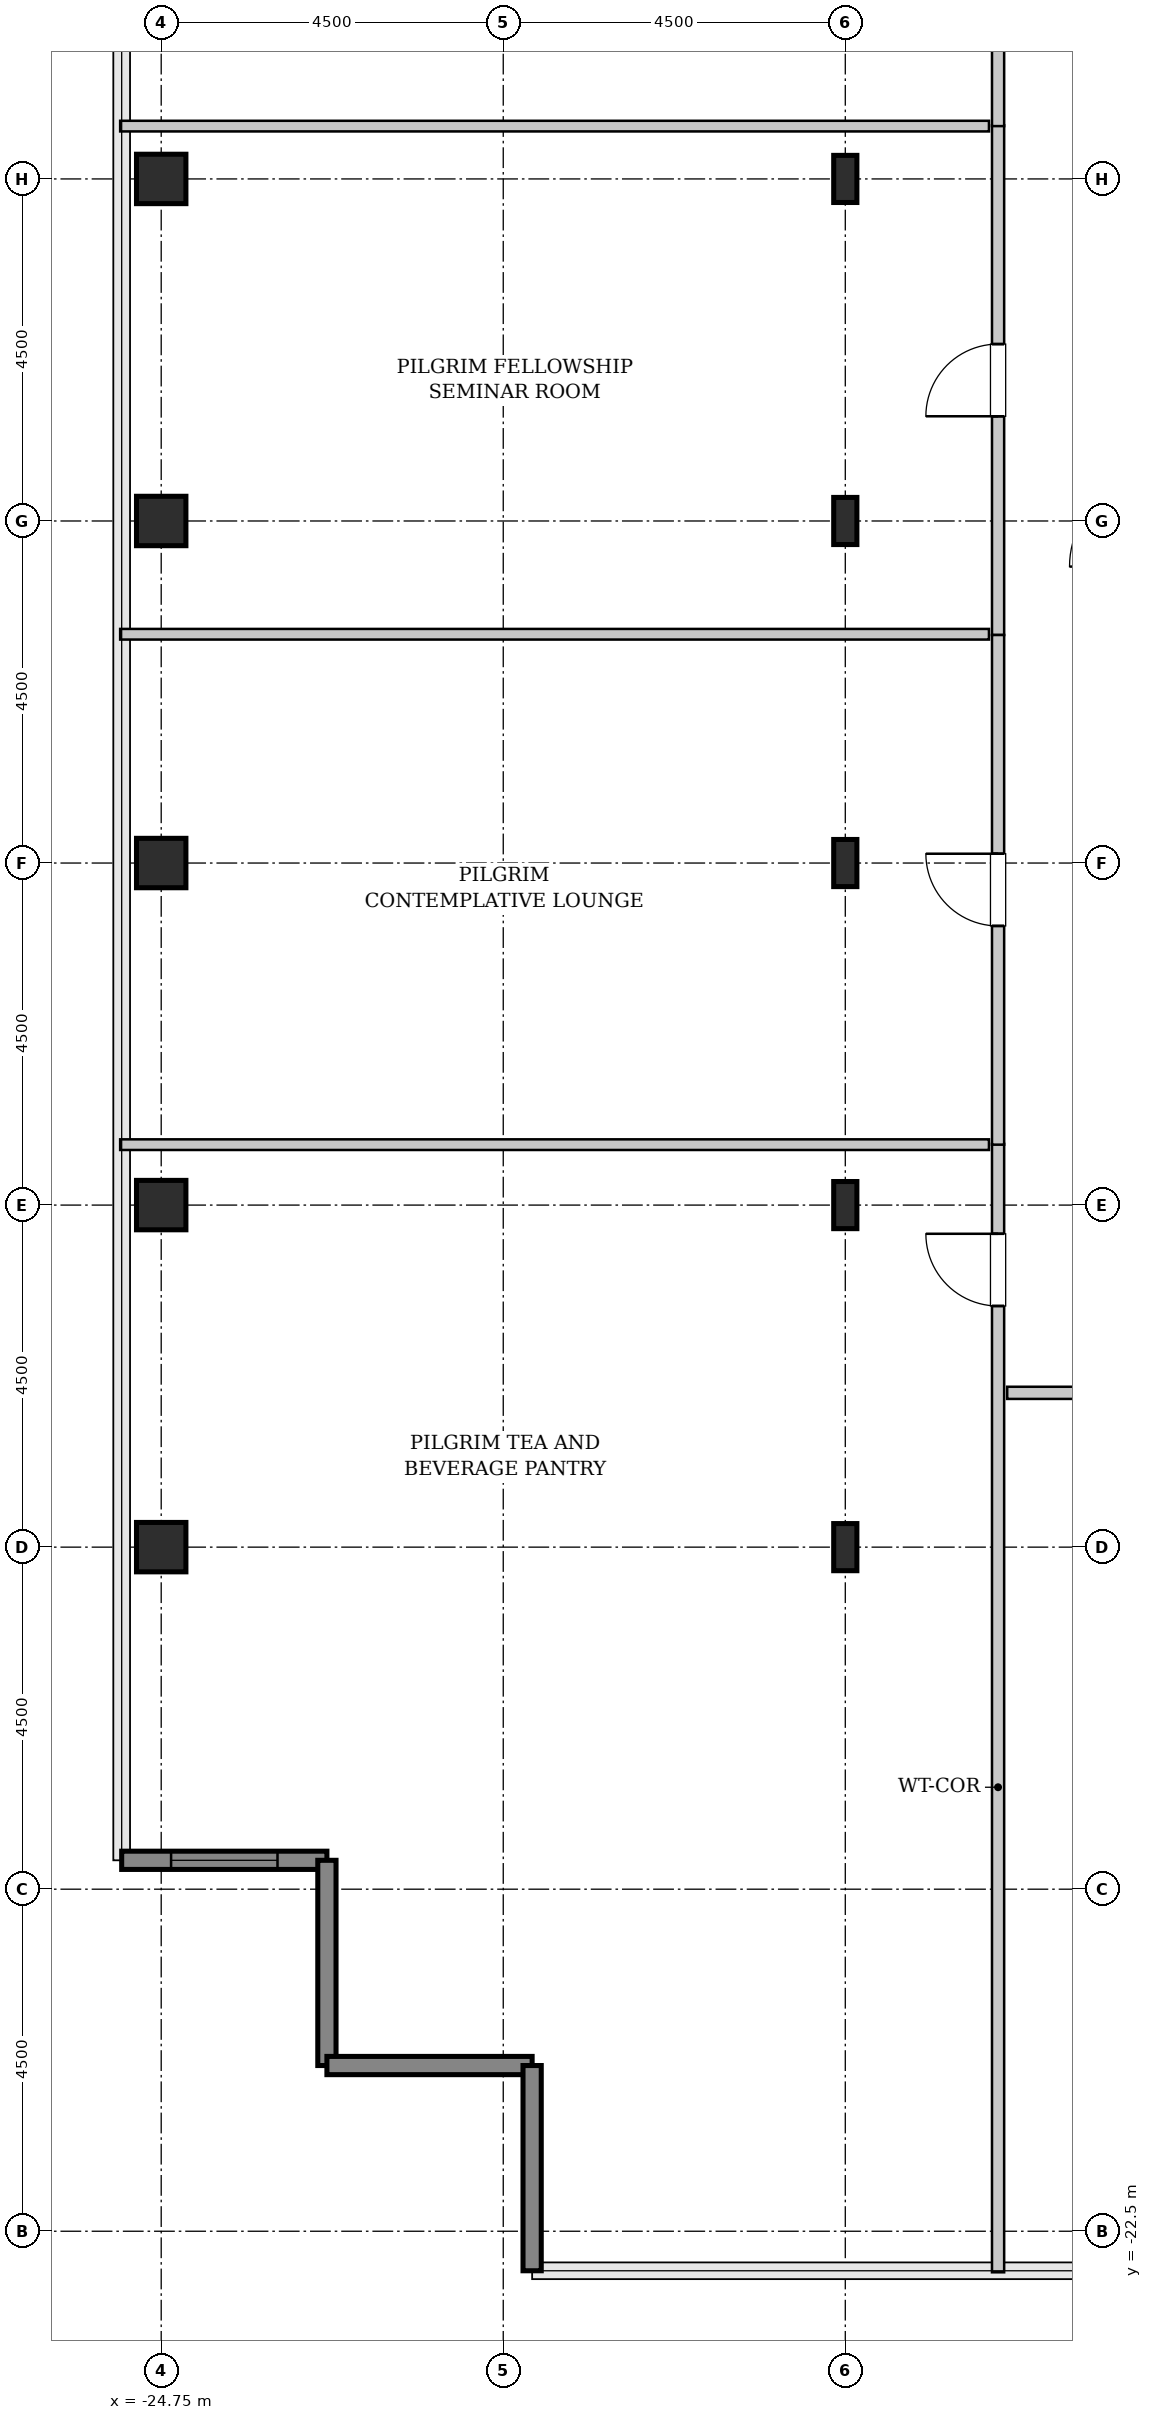
"""IFC4 building model, lengths in metres.
Left out: names, types, materials, properties, quantities, classifications, styles, units other than length and angle.
Written with IfcOpenShell. Run it as: python <this file> out.ifc"""

import sys

from ifc_helpers import new_model, si_unit, direction, frame, frame_2d, origin, origin_2d, place, context, subcontext, project, spatial, rectangle, hollow_rectangle, i_section, extrude, source, transform, mapped, element, fill, save


model = new_model("IFC4")
c1 = context("Model", 3, precision=1e-05, world=origin(), true_north=direction((0.0, 1.0)))
c2 = subcontext(c1, "Body", "Model", "MODEL_VIEW")
j1 = project(units=[si_unit("LENGTHUNIT", "METRE"), si_unit("PLANEANGLEUNIT", "RADIAN")], contexts=[c1])
p1 = place(None, origin())
s1 = spatial("IfcSite", under=j1, at=p1, CompositionType="ELEMENT")
p2 = place(p1, origin())
s2 = spatial("IfcBuilding", under=s1, at=p2, CompositionType="ELEMENT")
p3 = place(p2, frame((0.0, 0.0, 268.4)))
s3 = spatial("IfcBuildingStorey", under=s2, at=p3, CompositionType="ELEMENT", Elevation=268.4)
m1 = source(origin(), c2, "Body", "SweptSolid", [
    extrude(hollow_rectangle(XDim=0.65, YDim=0.65, WallThickness=0.032, InnerFilletRadius=0.032, OuterFilletRadius=0.064, at=origin_2d()), origin(), (0.0, 0.0, 1.0), 3.8),
])
for number, where, z_axis, x_axis in (
    (1, (-24.75, -13.5, 0.0), (0.0, 0.0, 1.0), (1.0, 0.0, 0.0)),
    (2, (-24.75, -9.0, 0.0), (0.0, 0.0, 1.0), (1.0, 0.0, 0.0)),
    (3, (-24.75, -4.5, 0.0), (0.0, 0.0, 1.0), (1.0, 0.0, 0.0)),
    (4, (-24.75, 0.0, 0.0), (0.0, 0.0, 1.0), (1.0, 0.0, 0.0)),
    (5, (-24.75, 4.5, 0.0), (0.0, 0.0, 1.0), (1.0, 0.0, 0.0)),
):
    element("IfcColumn", number, at=place(p3, frame(where, z_axis=z_axis, x_axis=x_axis)), inside=s3, PredefinedType="COLUMN", context=c2, shape_type="MappedRepresentation", body=[
        mapped(m1, transform((0.0, 0.0, 0.0), x_axis=(1.0, 0.0, 0.0), y_axis=(0.0, 1.0, 0.0), z_axis=(0.0, 0.0, 1.0), scale=1.0)),
    ])
m2 = source(origin(), c2, "Body", "SweptSolid", [
    extrude(i_section(OverallWidth=0.305, OverallDepth=0.62, WebThickness=0.021, FlangeThickness=0.04, FilletRadius=0.027, at=origin_2d()), origin(), (0.0, 0.0, 1.0), 3.8),
])
for number, where, z_axis, x_axis in (
    (6, (-15.75, -13.5, 0.0), (0.0, 0.0, 1.0), (1.0, 0.0, 0.0)),
    (7, (-15.75, -9.0, 0.0), (0.0, 0.0, 1.0), (1.0, 0.0, 0.0)),
    (8, (-15.75, -4.5, 0.0), (0.0, 0.0, 1.0), (1.0, 0.0, 0.0)),
    (9, (-15.75, 0.0, 0.0), (0.0, 0.0, 1.0), (1.0, 0.0, 0.0)),
    (10, (-15.75, 4.5, 0.0), (0.0, 0.0, 1.0), (1.0, 0.0, 0.0)),
):
    element("IfcColumn", number, at=place(p3, frame(where, z_axis=z_axis, x_axis=x_axis)), inside=s3, PredefinedType="COLUMN", context=c2, shape_type="MappedRepresentation", body=[
        mapped(m2, transform((0.0, 0.0, 0.0), x_axis=(1.0, 0.0, 0.0), y_axis=(0.0, 1.0, 0.0), z_axis=(0.0, 0.0, 1.0), scale=1.0)),
    ])
m3 = source(origin(), c2, "Body", "SweptSolid", [
    extrude(rectangle(XDim=2.7, YDim=0.24, at=frame_2d((1.35, 0.0))), origin(), (0.0, 0.0, 1.0), 3.55),
])
p4 = place(p3, frame((-25.27, -17.62, 0.0), z_axis=(0.0, 0.0, 1.0), x_axis=(1.0, 0.0, 0.0)))
e11 = element("IfcWall", 11, at=p4, inside=s3, PredefinedType="SHEAR", context=c2, shape_type="MappedRepresentation", body=[
    mapped(m3, transform((0.0, 0.0, 0.0), x_axis=(1.0, 0.0, 0.0), y_axis=(0.0, 1.0, 0.0), z_axis=(0.0, 0.0, 1.0), scale=1.0)),
])
p5 = place(p4, frame((0.65, 0.0, 0.85)))
e12 = element("IfcOpeningElement", 12, at=p5, cuts=e11, PredefinedType="OPENING", context=c2, shape_type="SweptSolid", body=[
    extrude(rectangle(XDim=1.4, YDim=1.8, at=frame_2d((0.7, 0.9))), frame((0.0, 0.13, 0.0), z_axis=(0.0, -1.0, 0.0), x_axis=(1.0, 0.0, 0.0)), (0.0, 0.0, 1.0), 0.26),
])
for number, where, z_axis, x_axis in (
    (13, (-22.57, -17.62, 0.0), (0.0, 0.0, 1.0), (0.0, -1.0, 0.0)),
    (14, (-22.57, -20.32, 0.0), (0.0, 0.0, 1.0), (1.0, 0.0, 0.0)),
    (15, (-19.87, -20.32, 0.0), (0.0, 0.0, 1.0), (0.0, -1.0, 0.0)),
):
    element("IfcWall", number, at=place(p3, frame(where, z_axis=z_axis, x_axis=x_axis)), inside=s3, PredefinedType="SHEAR", context=c2, shape_type="MappedRepresentation", body=[
        mapped(m3, transform((0.0, 0.0, 0.0), x_axis=(1.0, 0.0, 0.0), y_axis=(0.0, 1.0, 0.0), z_axis=(0.0, 0.0, 1.0), scale=1.0)),
    ])
m4 = source(origin(), c2, "Body", "SweptSolid", [
    extrude(rectangle(XDim=14.845, YDim=0.16, at=frame_2d((7.422, 0.0))), origin(), (0.0, 0.0, 1.0), 3.535),
])
p6 = place(p3, frame((-13.74, -23.04, 0.0), z_axis=(0.0, 0.0, 1.0), x_axis=(0.0, 1.0, 0.0)))
e16 = element("IfcWall", 16, at=p6, inside=s3, PredefinedType="PARTITIONING", context=c2, shape_type="MappedRepresentation", body=[
    mapped(m4, transform((0.0, 0.0, 0.0), x_axis=(1.0, 0.0, 0.0), y_axis=(0.0, 1.0, 0.0), z_axis=(0.0, 0.0, 1.0), scale=1.0)),
])
p7 = place(p6, frame((12.712, 0.0, 0.0)))
e17 = element("IfcOpeningElement", 17, at=p7, cuts=e16, PredefinedType="OPENING", context=c2, shape_type="SweptSolid", body=[
    extrude(rectangle(XDim=0.95, YDim=2.1, at=frame_2d((0.475, 1.05))), frame((0.0, 0.09, 0.0), z_axis=(0.0, -1.0, 0.0), x_axis=(1.0, 0.0, 0.0)), (0.0, 0.0, 1.0), 0.18),
])
m5 = source(origin(), c2, "Body", "SweptSolid", [
    extrude(rectangle(XDim=11.43, YDim=0.14, at=frame_2d((5.715, 0.0))), origin(), (0.0, 0.0, 1.0), 3.535),
])
p8 = place(p3, frame((-25.29, -8.205, 0.0), z_axis=(0.0, 0.0, 1.0), x_axis=(1.0, 0.0, 0.0)))
e18 = element("IfcWall", 18, at=p8, inside=s3, PredefinedType="PARTITIONING", context=c2, shape_type="MappedRepresentation", body=[
    mapped(m5, transform((0.0, 0.0, 0.0), x_axis=(1.0, 0.0, 0.0), y_axis=(0.0, 1.0, 0.0), z_axis=(0.0, 0.0, 1.0), scale=1.0)),
])
m6 = source(origin(), c2, "Body", "SweptSolid", [
    extrude(rectangle(XDim=6.705, YDim=0.16, at=frame_2d((3.353, 0.0))), origin(), (0.0, 0.0, 1.0), 3.535),
])
p9 = place(p3, frame((-13.74, -1.5, 0.0), z_axis=(0.0, 0.0, 1.0), x_axis=(0.0, 1.0, 0.0)))
e19 = element("IfcWall", 19, at=p9, inside=s3, PredefinedType="PARTITIONING", context=c2, shape_type="MappedRepresentation", body=[
    mapped(m6, transform((0.0, 0.0, 0.0), x_axis=(1.0, 0.0, 0.0), y_axis=(0.0, 1.0, 0.0), z_axis=(0.0, 0.0, 1.0), scale=1.0)),
])
p10 = place(p9, frame((2.877, 0.0, 0.0)))
e20 = element("IfcOpeningElement", 20, at=p10, cuts=e19, PredefinedType="OPENING", context=c2, shape_type="SweptSolid", body=[
    extrude(rectangle(XDim=0.95, YDim=2.1, at=frame_2d((0.475, 1.05))), frame((0.0, 0.09, 0.0), z_axis=(0.0, -1.0, 0.0), x_axis=(1.0, 0.0, 0.0)), (0.0, 0.0, 1.0), 0.18),
])
for number, where, z_axis, x_axis in (
    (21, (-25.29, 5.195, 0.0), (0.0, 0.0, 1.0), (1.0, 0.0, 0.0)),
    (22, (-25.29, -1.49, 0.0), (0.0, 0.0, 1.0), (1.0, 0.0, 0.0)),
):
    element("IfcWall", number, at=place(p3, frame(where, z_axis=z_axis, x_axis=x_axis)), inside=s3, PredefinedType="PARTITIONING", context=c2, shape_type="MappedRepresentation", body=[
        mapped(m5, transform((0.0, 0.0, 0.0), x_axis=(1.0, 0.0, 0.0), y_axis=(0.0, 1.0, 0.0), z_axis=(0.0, 0.0, 1.0), scale=1.0)),
    ])
p11 = place(p3, frame((-13.74, -8.205, 0.0), z_axis=(0.0, 0.0, 1.0), x_axis=(0.0, 1.0, 0.0)))
e23 = element("IfcWall", 23, at=p11, inside=s3, PredefinedType="PARTITIONING", context=c2, shape_type="MappedRepresentation", body=[
    mapped(m6, transform((0.0, 0.0, 0.0), x_axis=(1.0, 0.0, 0.0), y_axis=(0.0, 1.0, 0.0), z_axis=(0.0, 0.0, 1.0), scale=1.0)),
])
p12 = place(p11, frame((2.877, 0.0, 0.0)))
e24 = element("IfcOpeningElement", 24, at=p12, cuts=e23, PredefinedType="OPENING", context=c2, shape_type="SweptSolid", body=[
    extrude(rectangle(XDim=0.95, YDim=2.1, at=frame_2d((0.475, 1.05))), frame((0.0, 0.09, 0.0), z_axis=(0.0, -1.0, 0.0), x_axis=(1.0, 0.0, 0.0)), (0.0, 0.0, 1.0), 0.18),
])
m7 = source(origin(), c2, "Body", "SweptSolid", [
    extrude(rectangle(XDim=16.045, YDim=0.16, at=frame_2d((8.022, 0.0))), origin(), (0.0, 0.0, 1.0), 3.535),
])
p13 = place(p3, frame((-13.74, 5.195, 0.0), z_axis=(0.0, 0.0, 1.0), x_axis=(0.0, 1.0, 0.0)))
e25 = element("IfcWall", 25, at=p13, inside=s3, PredefinedType="PARTITIONING", context=c2, shape_type="MappedRepresentation", body=[
    mapped(m7, transform((0.0, 0.0, 0.0), x_axis=(1.0, 0.0, 0.0), y_axis=(0.0, 1.0, 0.0), z_axis=(0.0, 0.0, 1.0), scale=1.0)),
])
p14 = place(p13, frame((2.683, 0.0, 0.0)))
e26 = element("IfcOpeningElement", 26, at=p14, cuts=e25, PredefinedType="OPENING", context=c2, shape_type="SweptSolid", body=[
    extrude(rectangle(XDim=0.95, YDim=2.1, at=frame_2d((0.475, 1.05))), frame((0.0, 0.09, 0.0), z_axis=(0.0, -1.0, 0.0), x_axis=(1.0, 0.0, 0.0)), (0.0, 0.0, 1.0), 0.18),
])
m8 = source(origin(), c2, "Body", "SweptSolid", [
    extrude(rectangle(XDim=4.425, YDim=0.16, at=frame_2d((2.212, 0.0))), origin(), (0.0, 0.0, 1.0), 3.535),
])
p15 = place(p3, frame((-13.62, -11.47, 0.0), z_axis=(0.0, 0.0, 1.0), x_axis=(1.0, 0.0, 0.0)))
e27 = element("IfcWall", 27, at=p15, inside=s3, PredefinedType="PARTITIONING", context=c2, shape_type="MappedRepresentation", body=[
    mapped(m8, transform((0.0, 0.0, 0.0), x_axis=(1.0, 0.0, 0.0), y_axis=(0.0, 1.0, 0.0), z_axis=(0.0, 0.0, 1.0), scale=1.0)),
])
p16 = place(p15, frame((1.738, 0.0, 0.0)))
e28 = element("IfcOpeningElement", 28, at=p16, cuts=e27, PredefinedType="OPENING", context=c2, shape_type="SweptSolid", body=[
    extrude(rectangle(XDim=0.95, YDim=2.1, at=frame_2d((0.475, 1.05))), frame((0.0, 0.09, 0.0), z_axis=(0.0, -1.0, 0.0), x_axis=(1.0, 0.0, 0.0)), (0.0, 0.0, 1.0), 0.18),
])
m9 = source(origin(), c2, "Body", "SweptSolid", [
    extrude(rectangle(XDim=1.4, YDim=1.8, at=frame_2d((0.7, 0.9))), frame((0.0, 0.03, 0.0), z_axis=(0.0, -1.0, 0.0), x_axis=(1.0, 0.0, 0.0)), (0.0, 0.0, 1.0), 0.06),
])
p17 = place(p5, origin())
e29 = element("IfcWindow", 29, at=p17, inside=s3, PartitioningType="SINGLE_PANEL", PredefinedType="WINDOW", context=c2, shape_type="MappedRepresentation", body=[
    mapped(m9, transform((0.0, 0.0, 0.0), x_axis=(1.0, 0.0, 0.0), y_axis=(0.0, 1.0, 0.0), z_axis=(0.0, 0.0, 1.0), scale=1.0)),
])
fill(e12, e29)
m10 = source(origin(), c2, "Body", "SweptSolid", [
    extrude(rectangle(XDim=0.95, YDim=2.1, at=frame_2d((0.475, 1.05))), frame((0.0, 0.025, 0.0), z_axis=(0.0, -1.0, 0.0), x_axis=(1.0, 0.0, 0.0)), (0.0, 0.0, 1.0), 0.05),
])
p18 = place(p7, origin())
e30 = element("IfcDoor", 30, at=p18, inside=s3, OperationType="SINGLE_SWING_RIGHT", PredefinedType="DOOR", context=c2, shape_type="MappedRepresentation", body=[
    mapped(m10, transform((0.0, 0.0, 0.0), x_axis=(1.0, 0.0, 0.0), y_axis=(0.0, 1.0, 0.0), z_axis=(0.0, 0.0, 1.0), scale=1.0)),
])
fill(e17, e30)
p19 = place(p10, origin())
e31 = element("IfcDoor", 31, at=p19, inside=s3, OperationType="SINGLE_SWING_LEFT", PredefinedType="DOOR", context=c2, shape_type="MappedRepresentation", body=[
    mapped(m10, transform((0.0, 0.0, 0.0), x_axis=(1.0, 0.0, 0.0), y_axis=(0.0, 1.0, 0.0), z_axis=(0.0, 0.0, 1.0), scale=1.0)),
])
fill(e20, e31)
p20 = place(p12, origin())
e32 = element("IfcDoor", 32, at=p20, inside=s3, OperationType="SINGLE_SWING_RIGHT", PredefinedType="DOOR", context=c2, shape_type="MappedRepresentation", body=[
    mapped(m10, transform((0.0, 0.0, 0.0), x_axis=(1.0, 0.0, 0.0), y_axis=(0.0, 1.0, 0.0), z_axis=(0.0, 0.0, 1.0), scale=1.0)),
])
fill(e24, e32)
save(model, sys.argv[1])
